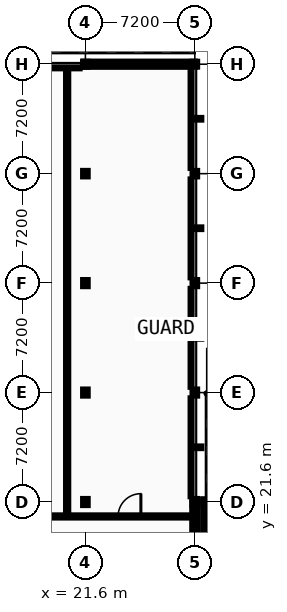
"""IFC4 building model, lengths in metres.
Left out: names, types, materials, properties, quantities, classifications, styles, units other than length and angle.
Written with IfcOpenShell. Run it as: python <this file> out.ifc"""

import sys

from ifc_helpers import new_model, si_unit, direction, frame, frame_2d, origin, origin_2d, place, context, subcontext, project, spatial, rectangle, i_section, extrude, element, fill, save


model = new_model("IFC4")
c1 = context("Model", 3, precision=1e-05, world=origin(), true_north=direction((0.0, 1.0)))
c2 = subcontext(c1, "Body", "Model", "MODEL_VIEW")
j1 = project(units=[si_unit("LENGTHUNIT", "METRE"), si_unit("PLANEANGLEUNIT", "RADIAN")], contexts=[c1])
p1 = place(None, origin())
s1 = spatial("IfcSite", under=j1, at=p1, CompositionType="ELEMENT")
p2 = place(p1, origin())
s2 = spatial("IfcBuilding", under=s1, at=p2, CompositionType="ELEMENT")
p3 = place(p2, frame((0.0, 0.0, 14.0)))
s3 = spatial("IfcBuildingStorey", under=s2, at=p3, CompositionType="ELEMENT", Elevation=14.0)
for number, where, z_axis, x_axis in (
    (1, (21.6, 21.6, 0.0), (0.0, 0.0, 1.0), (1.0, 0.0, 0.0)),
    (2, (21.6, 28.8, 0.0), (0.0, 0.0, 1.0), (1.0, 0.0, 0.0)),
    (3, (21.6, 36.0, 0.0), (0.0, 0.0, 1.0), (1.0, 0.0, 0.0)),
):
    element("IfcColumn", number, at=place(p3, frame(where, z_axis=z_axis, x_axis=x_axis)), inside=s3, PredefinedType="COLUMN", context=c2, shape_type="SweptSolid", body=[
        extrude(i_section(OverallWidth=0.3, OverallDepth=0.4, WebThickness=0.013, FlangeThickness=0.024, FilletRadius=0.027, at=origin_2d()), origin(), (0.0, 0.0, 1.0), 4.4),
    ])
p4 = place(p3, frame((21.6, 43.2, 0.0), z_axis=(0.0, 0.0, 1.0), x_axis=(1.0, 0.0, 0.0)))
e4 = element("IfcColumn", 4, at=p4, inside=s3, PredefinedType="COLUMN", context=c2, shape_type="SweptSolid", body=[
    extrude(i_section(OverallWidth=0.3, OverallDepth=0.36, WebThickness=0.012, FlangeThickness=0.022, FilletRadius=0.027, at=origin_2d()), origin(), (0.0, 0.0, 1.0), 4.4),
])
p5 = place(p3, frame((21.6, 50.4, 0.0), z_axis=(0.0, 0.0, 1.0), x_axis=(1.0, 0.0, 0.0)))
e5 = element("IfcColumn", 5, at=p5, inside=s3, PredefinedType="COLUMN", context=c2, shape_type="SweptSolid", body=[
    extrude(i_section(OverallWidth=0.3, OverallDepth=0.32, WebThickness=0.011, FlangeThickness=0.021, FilletRadius=0.027, at=origin_2d()), origin(), (0.0, 0.0, 1.0), 4.4),
])
for number, where, z_axis, x_axis in (
    (6, (28.8, 21.6, 0.0), (0.0, 0.0, 1.0), (1.0, 0.0, 0.0)),
    (7, (28.8, 28.8, 0.0), (0.0, 0.0, 1.0), (1.0, 0.0, 0.0)),
    (8, (28.8, 36.0, 0.0), (0.0, 0.0, 1.0), (1.0, 0.0, 0.0)),
):
    element("IfcColumn", number, at=place(p3, frame(where, z_axis=z_axis, x_axis=x_axis)), inside=s3, PredefinedType="COLUMN", context=c2, shape_type="SweptSolid", body=[
        extrude(i_section(OverallWidth=0.3, OverallDepth=0.4, WebThickness=0.013, FlangeThickness=0.024, FilletRadius=0.027, at=origin_2d()), origin(), (0.0, 0.0, 1.0), 4.4),
    ])
p6 = place(p3, frame((28.8, 43.2, 0.0), z_axis=(0.0, 0.0, 1.0), x_axis=(1.0, 0.0, 0.0)))
e9 = element("IfcColumn", 9, at=p6, inside=s3, PredefinedType="COLUMN", context=c2, shape_type="SweptSolid", body=[
    extrude(i_section(OverallWidth=0.3, OverallDepth=0.36, WebThickness=0.012, FlangeThickness=0.022, FilletRadius=0.027, at=origin_2d()), origin(), (0.0, 0.0, 1.0), 4.4),
])
for number, where, z_axis, x_axis in (
    (10, (28.8, 50.4, 0.0), (0.0, 0.0, 1.0), (1.0, 0.0, 0.0)),
    (11, (29.52, 21.6, 0.0), (0.0, 0.0, 1.0), (1.0, 0.0, 0.0)),
):
    element("IfcColumn", number, at=place(p3, frame(where, z_axis=z_axis, x_axis=x_axis)), inside=s3, PredefinedType="COLUMN", context=c2, shape_type="SweptSolid", body=[
        extrude(i_section(OverallWidth=0.3, OverallDepth=0.32, WebThickness=0.011, FlangeThickness=0.021, FilletRadius=0.027, at=origin_2d()), origin(), (0.0, 0.0, 1.0), 4.4),
    ])
p7 = place(p3, frame((28.8, 50.4, 0.0), z_axis=(0.0, 0.0, 1.0), x_axis=(-1.0, 0.0, 0.0)))
e12 = element("IfcWall", 12, at=p7, inside=s3, PredefinedType="STANDARD", context=c2, shape_type="SweptSolid", body=[
    extrude(rectangle(XDim=7.31, YDim=0.34, at=frame_2d((3.655, 0.0))), origin(), (0.0, 0.0, 1.0), 3.935),
])
p8 = place(p7, frame((1.559, 0.0, 0.95)))
e13 = element("IfcOpeningElement", 13, at=p8, cuts=e12, PredefinedType="OPENING", context=c2, shape_type="SweptSolid", body=[
    extrude(rectangle(XDim=1.268, YDim=1.332, at=frame_2d((0.634, 0.666))), frame((0.0, 0.18, 0.0), z_axis=(0.0, -1.0, 0.0), x_axis=(1.0, 0.0, 0.0)), (0.0, 0.0, 1.0), 0.36),
])
p9 = place(p7, frame((4.483, 0.0, 0.95)))
e14 = element("IfcOpeningElement", 14, at=p9, cuts=e12, PredefinedType="OPENING", context=c2, shape_type="SweptSolid", body=[
    extrude(rectangle(XDim=1.268, YDim=1.332, at=frame_2d((0.634, 0.666))), frame((0.0, 0.18, 0.0), z_axis=(0.0, -1.0, 0.0), x_axis=(1.0, 0.0, 0.0)), (0.0, 0.0, 1.0), 0.36),
])
p10 = place(p3, frame((28.8, 14.45, 0.0), z_axis=(0.0, 0.0, 1.0), x_axis=(0.0, 1.0, 0.0)))
e15 = element("IfcWall", 15, at=p10, inside=s3, PredefinedType="STANDARD", context=c2, shape_type="SweptSolid", body=[
    extrude(rectangle(XDim=7.15, YDim=0.34, at=frame_2d((3.575, 0.0))), origin(), (0.0, 0.0, 1.0), 4.2),
])
p11 = place(p10, frame((1.596, 0.0, 0.95)))
e16 = element("IfcOpeningElement", 16, at=p11, cuts=e15, PredefinedType="OPENING", context=c2, shape_type="SweptSolid", body=[
    extrude(rectangle(XDim=1.098, YDim=1.368, at=frame_2d((0.549, 0.684))), frame((0.0, 0.18, 0.0), z_axis=(0.0, -1.0, 0.0), x_axis=(1.0, 0.0, 0.0)), (0.0, 0.0, 1.0), 0.36),
])
p12 = place(p10, frame((4.456, 0.0, 0.95)))
e17 = element("IfcOpeningElement", 17, at=p12, cuts=e15, PredefinedType="OPENING", context=c2, shape_type="SweptSolid", body=[
    extrude(rectangle(XDim=1.098, YDim=1.368, at=frame_2d((0.549, 0.684))), frame((0.0, 0.18, 0.0), z_axis=(0.0, -1.0, 0.0), x_axis=(1.0, 0.0, 0.0)), (0.0, 0.0, 1.0), 0.36),
])
p13 = place(p3, frame((29.52, 21.77, 0.0), z_axis=(0.0, 0.0, 1.0), x_axis=(0.0, -1.0, 0.0)))
e18 = element("IfcWall", 18, at=p13, inside=s3, PredefinedType="STANDARD", context=c2, shape_type="SweptSolid", body=[
    extrude(rectangle(XDim=7.37, YDim=0.34, at=frame_2d((3.685, 0.0))), origin(), (0.0, 0.0, 1.0), 3.895),
])
p14 = place(p13, frame((1.73, 0.0, 0.95)))
e19 = element("IfcOpeningElement", 19, at=p14, cuts=e18, PredefinedType="OPENING", context=c2, shape_type="SweptSolid", body=[
    extrude(rectangle(XDim=0.962, YDim=1.404, at=frame_2d((0.481, 0.702))), frame((0.0, 0.18, 0.0), z_axis=(0.0, -1.0, 0.0), x_axis=(1.0, 0.0, 0.0)), (0.0, 0.0, 1.0), 0.36),
])
p15 = place(p13, frame((4.678, 0.0, 0.95)))
e20 = element("IfcOpeningElement", 20, at=p15, cuts=e18, PredefinedType="OPENING", context=c2, shape_type="SweptSolid", body=[
    extrude(rectangle(XDim=0.962, YDim=1.404, at=frame_2d((0.481, 0.702))), frame((0.0, 0.18, 0.0), z_axis=(0.0, -1.0, 0.0), x_axis=(1.0, 0.0, 0.0)), (0.0, 0.0, 1.0), 0.36),
])
p16 = place(p3, frame((14.7, 20.65, 0.0), z_axis=(0.0, 0.0, 1.0), x_axis=(1.0, 0.0, 0.0)))
e21 = element("IfcWall", 21, at=p16, inside=s3, PredefinedType="PARTITIONING", context=c2, shape_type="SweptSolid", body=[
    extrude(rectangle(XDim=13.9, YDim=0.142, at=frame_2d((6.95, 0.0))), origin(), (0.0, 0.0, 1.0), 4.2),
])
p17 = place(p16, frame((2.384, 0.0, 0.0)))
e22 = element("IfcOpeningElement", 22, at=p17, cuts=e21, PredefinedType="OPENING", context=c2, shape_type="SweptSolid", body=[
    extrude(rectangle(XDim=0.932, YDim=2.04, at=frame_2d((0.466, 1.02))), frame((0.0, 0.081, 0.0), z_axis=(0.0, -1.0, 0.0), x_axis=(1.0, 0.0, 0.0)), (0.0, 0.0, 1.0), 0.162),
])
p18 = place(p16, frame((9.05, 0.0, 0.0)))
e23 = element("IfcOpeningElement", 23, at=p18, cuts=e21, PredefinedType="OPENING", context=c2, shape_type="SweptSolid", body=[
    extrude(rectangle(XDim=1.5, YDim=2.2, at=frame_2d((0.75, 1.1))), frame((0.0, 0.081, 0.0), z_axis=(0.0, -1.0, 0.0), x_axis=(1.0, 0.0, 0.0)), (0.0, 0.0, 1.0), 0.162),
])
p19 = place(p3, frame((14.78, 50.2, 0.0), z_axis=(0.0, 0.0, 1.0), x_axis=(1.0, 0.0, 0.0)))
e24 = element("IfcWall", 24, at=p19, inside=s3, PredefinedType="PARTITIONING", context=c2, shape_type="SweptSolid", body=[
    extrude(rectangle(XDim=6.44, YDim=0.142, at=frame_2d((3.22, 0.0))), origin(), (0.0, 0.0, 1.0), 3.935),
])
p20 = place(p3, frame((20.4, 20.721, 0.0), z_axis=(0.0, 0.0, 1.0), x_axis=(0.0, 1.0, 0.0)))
e25 = element("IfcWall", 25, at=p20, inside=s3, PredefinedType="PARTITIONING", context=c2, shape_type="SweptSolid", body=[
    extrude(rectangle(XDim=29.408, YDim=0.142, at=frame_2d((14.704, 0.0))), origin(), (0.0, 0.0, 1.0), 4.2),
])
p21 = place(p3, frame((28.6, 21.98, 0.0), z_axis=(0.0, 0.0, 1.0), x_axis=(0.0, 1.0, 0.0)))
e26 = element("IfcWall", 26, at=p21, inside=s3, PredefinedType="PARTITIONING", context=c2, shape_type="SweptSolid", body=[
    extrude(rectangle(XDim=6.44, YDim=0.158, at=frame_2d((3.22, 0.0))), origin(), (0.0, 0.0, 1.0), 3.885),
])
for number, where, z_axis, x_axis in (
    (27, (28.6, 29.18, 0.0), (0.0, 0.0, 1.0), (0.0, 1.0, 0.0)),
    (28, (28.6, 36.38, 0.0), (0.0, 0.0, 1.0), (0.0, 1.0, 0.0)),
):
    element("IfcWall", number, at=place(p3, frame(where, z_axis=z_axis, x_axis=x_axis)), inside=s3, PredefinedType="PARTITIONING", context=c2, shape_type="SweptSolid", body=[
        extrude(rectangle(XDim=6.44, YDim=0.158, at=frame_2d((3.22, 0.0))), origin(), (0.0, 0.0, 1.0), 3.885),
    ])
p22 = place(p3, frame((28.6, 43.58, 0.0), z_axis=(0.0, 0.0, 1.0), x_axis=(0.0, 1.0, 0.0)))
e29 = element("IfcWall", 29, at=p22, inside=s3, PredefinedType="PARTITIONING", context=c2, shape_type="SweptSolid", body=[
    extrude(rectangle(XDim=6.44, YDim=0.158, at=frame_2d((3.22, 0.0))), origin(), (0.0, 0.0, 1.0), 3.885),
])
p23 = place(p8, origin())
e30 = element("IfcWindow", 30, at=p23, inside=s3, PartitioningType="SINGLE_PANEL", PredefinedType="WINDOW", context=c2, shape_type="SweptSolid", body=[
    extrude(rectangle(XDim=1.268, YDim=1.332, at=frame_2d((0.634, 0.666))), frame((0.0, 0.03, 0.0), z_axis=(0.0, -1.0, 0.0), x_axis=(1.0, 0.0, 0.0)), (0.0, 0.0, 1.0), 0.06),
])
fill(e13, e30)
p24 = place(p9, origin())
e31 = element("IfcWindow", 31, at=p24, inside=s3, PartitioningType="SINGLE_PANEL", PredefinedType="WINDOW", context=c2, shape_type="SweptSolid", body=[
    extrude(rectangle(XDim=1.268, YDim=1.332, at=frame_2d((0.634, 0.666))), frame((0.0, 0.03, 0.0), z_axis=(0.0, -1.0, 0.0), x_axis=(1.0, 0.0, 0.0)), (0.0, 0.0, 1.0), 0.06),
])
fill(e14, e31)
p25 = place(p12, origin())
e32 = element("IfcWindow", 32, at=p25, inside=s3, PartitioningType="SINGLE_PANEL", PredefinedType="WINDOW", context=c2, shape_type="SweptSolid", body=[
    extrude(rectangle(XDim=1.098, YDim=1.368, at=frame_2d((0.549, 0.684))), frame((0.0, 0.03, 0.0), z_axis=(0.0, -1.0, 0.0), x_axis=(1.0, 0.0, 0.0)), (0.0, 0.0, 1.0), 0.06),
])
fill(e17, e32)
p26 = place(p14, origin())
e33 = element("IfcWindow", 33, at=p26, inside=s3, PartitioningType="SINGLE_PANEL", PredefinedType="WINDOW", context=c2, shape_type="SweptSolid", body=[
    extrude(rectangle(XDim=0.962, YDim=1.404, at=frame_2d((0.481, 0.702))), frame((0.0, 0.03, 0.0), z_axis=(0.0, -1.0, 0.0), x_axis=(1.0, 0.0, 0.0)), (0.0, 0.0, 1.0), 0.06),
])
fill(e19, e33)
p27 = place(p18, frame((1.5, 0.0, 0.0), z_axis=(0.0, 0.0, 1.0), x_axis=(-1.0, 0.0, 0.0)))
e34 = element("IfcDoor", 34, at=p27, inside=s3, OperationType="DOUBLE_DOOR_SINGLE_SWING", PredefinedType="DOOR", context=c2, shape_type="SweptSolid", body=[
    extrude(rectangle(XDim=1.5, YDim=2.2, at=frame_2d((0.75, 1.1))), frame((0.0, 0.025, 0.0), z_axis=(0.0, -1.0, 0.0), x_axis=(1.0, 0.0, 0.0)), (0.0, 0.0, 1.0), 0.05),
])
fill(e23, e34)
save(model, sys.argv[1])
